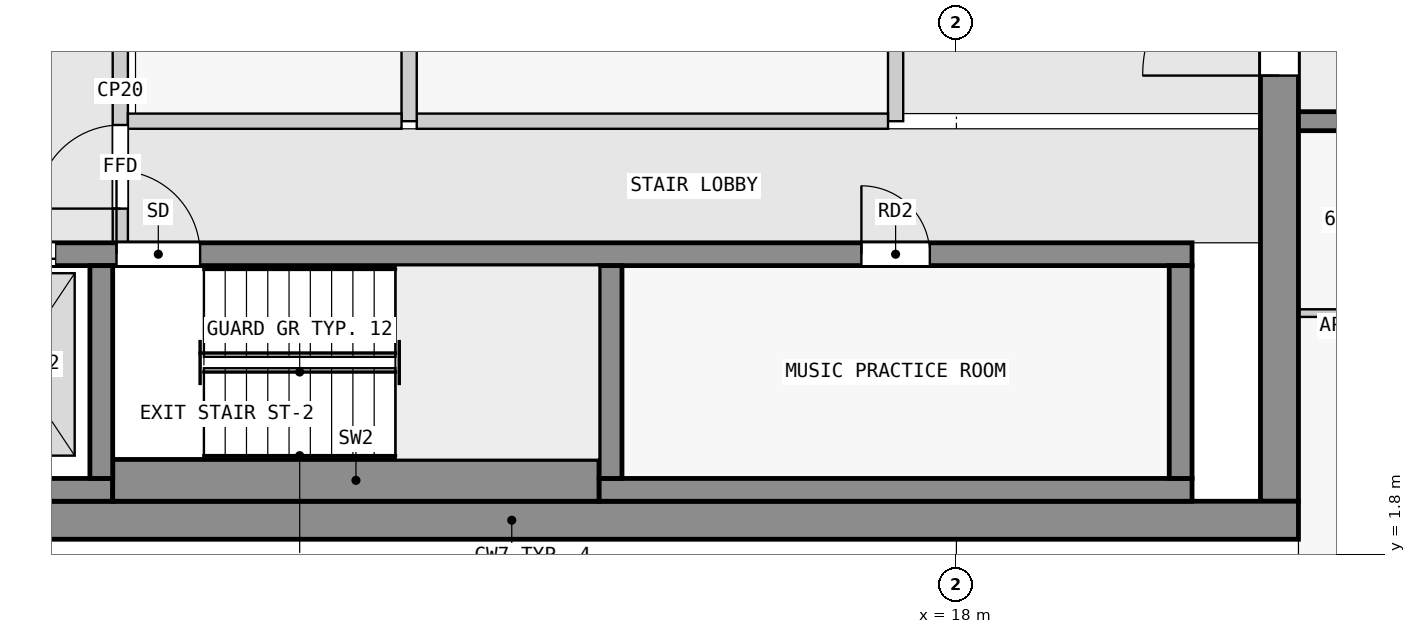
"""IFC4 building model, lengths in metres.
Left out: names, types, materials, properties, quantities, classifications, styles, units other than length and angle.
Written with IfcOpenShell. Run it as: python <this file> out.ifc"""

import sys

from ifc_helpers import new_model, si_unit, direction, frame, frame_2d, origin, place, context, subcontext, project, spatial, rectangle, extrude, element, fill, save


model = new_model("IFC4")
c1 = context("Model", 3, precision=1e-05, world=origin(), true_north=direction((0.0, 1.0)))
c2 = subcontext(c1, "Body", "Model", "MODEL_VIEW")
j1 = project(units=[si_unit("LENGTHUNIT", "METRE"), si_unit("PLANEANGLEUNIT", "RADIAN")], contexts=[c1])
p1 = place(None, origin())
s1 = spatial("IfcSite", under=j1, at=p1, CompositionType="ELEMENT")
p2 = place(p1, origin())
s2 = spatial("IfcBuilding", under=s1, at=p2, CompositionType="ELEMENT")
p3 = place(p2, frame((0.0, 0.0, 249.4)))
s3 = spatial("IfcBuildingStorey", under=s2, at=p3, CompositionType="ELEMENT", Elevation=249.4)
p4 = place(p3, frame((1.8, 2.25, 0.0), z_axis=(0.0, 0.0, 1.0), x_axis=(1.0, 0.0, 0.0)))
e1 = element("IfcWall", 1, at=p4, inside=s3, PredefinedType="SHEAR", context=c2, shape_type="SweptSolid", body=[
    extrude(rectangle(XDim=20.7, YDim=0.5, at=frame_2d((10.35, 0.0))), origin(), (0.0, 0.0, 1.0), 3.25),
])
p5 = place(p3, frame((22.25, 2.5, 0.0), z_axis=(0.0, 0.0, 1.0), x_axis=(0.0, 1.0, 0.0)))
e2 = element("IfcWall", 2, at=p5, inside=s3, PredefinedType="SHEAR", context=c2, shape_type="SweptSolid", body=[
    extrude(rectangle(XDim=15.0, YDim=0.5, at=frame_2d((7.5, 0.0))), origin(), (0.0, 0.0, 1.0), 3.25),
])
p6 = place(p5, frame((5.6, 0.0, 0.0)))
e3 = element("IfcOpeningElement", 3, at=p6, cuts=e2, PredefinedType="OPENING", context=c2, shape_type="SweptSolid", body=[
    extrude(rectangle(XDim=1.8, YDim=2.1, at=frame_2d((0.9, 1.05))), frame((0.0, 0.26, 0.0), z_axis=(0.0, -1.0, 0.0), x_axis=(1.0, 0.0, 0.0)), (0.0, 0.0, 1.0), 0.52),
])
p7 = place(p3, frame((2.3, 2.65, 0.0), z_axis=(0.0, 0.0, 1.0), x_axis=(1.0, 0.0, 0.0)))
e4 = element("IfcWall", 4, at=p7, inside=s3, PredefinedType="SHEAR", context=c2, shape_type="SweptSolid", body=[
    extrude(rectangle(XDim=4.6, YDim=0.3, at=frame_2d((2.3, 0.0))), origin(), (0.0, 0.0, 1.0), 3.25),
])
p8 = place(p3, frame((6.9, 2.775, 0.0), z_axis=(0.0, 0.0, 1.0), x_axis=(1.0, 0.0, 0.0)))
e5 = element("IfcWall", 5, at=p8, inside=s3, PredefinedType="SHEAR", context=c2, shape_type="SweptSolid", body=[
    extrude(rectangle(XDim=6.4, YDim=0.55, at=frame_2d((3.2, 0.0))), origin(), (0.0, 0.0, 1.0), 3.25),
])
p9 = place(p3, frame((13.3, 2.65, 0.0), z_axis=(0.0, 0.0, 1.0), x_axis=(1.0, 0.0, 0.0)))
e6 = element("IfcWall", 6, at=p9, inside=s3, PredefinedType="SHEAR", context=c2, shape_type="SweptSolid", body=[
    extrude(rectangle(XDim=7.8, YDim=0.3, at=frame_2d((3.9, 0.0))), origin(), (0.0, 0.0, 1.0), 3.25),
])
for number, where, z_axis, x_axis in (
    (7, (6.75, 2.8, 0.0), (0.0, 0.0, 1.0), (0.0, 1.0, 0.0)),
    (8, (13.45, 2.8, 0.0), (0.0, 0.0, 1.0), (0.0, 1.0, 0.0)),
    (9, (20.95, 2.8, 0.0), (0.0, 0.0, 1.0), (0.0, 1.0, 0.0)),
):
    element("IfcWall", number, at=place(p3, frame(where, z_axis=z_axis, x_axis=x_axis)), inside=s3, PredefinedType="SHEAR", context=c2, shape_type="SweptSolid", body=[
        extrude(rectangle(XDim=2.8, YDim=0.3, at=frame_2d((1.4, 0.0))), origin(), (0.0, 0.0, 1.0), 3.25),
    ])
p10 = place(p3, frame((2.3, 5.75, 0.0), z_axis=(0.0, 0.0, 1.0), x_axis=(1.0, 0.0, 0.0)))
e10 = element("IfcWall", 10, at=p10, inside=s3, PredefinedType="SHEAR", context=c2, shape_type="SweptSolid", body=[
    extrude(rectangle(XDim=18.8, YDim=0.3, at=frame_2d((9.4, 0.0))), origin(), (0.0, 0.0, 1.0), 3.25),
])
p11 = place(p10, frame((4.65, 0.0, 0.0)))
e11 = element("IfcOpeningElement", 11, at=p11, cuts=e10, PredefinedType="OPENING", context=c2, shape_type="SweptSolid", body=[
    extrude(rectangle(XDim=1.1, YDim=2.1, at=frame_2d((0.55, 1.05))), frame((0.0, 0.16, 0.0), z_axis=(0.0, -1.0, 0.0), x_axis=(1.0, 0.0, 0.0)), (0.0, 0.0, 1.0), 0.32),
])
p12 = place(p10, frame((0.45, 0.0, 0.0)))
e12 = element("IfcOpeningElement", 12, at=p12, cuts=e10, PredefinedType="OPENING", context=c2, shape_type="SweptSolid", body=[
    extrude(rectangle(XDim=1.1, YDim=2.1, at=frame_2d((0.55, 1.05))), frame((0.0, 0.16, 0.0), z_axis=(0.0, -1.0, 0.0), x_axis=(1.0, 0.0, 0.0)), (0.0, 0.0, 1.0), 0.32),
])
p13 = place(p10, frame((2.75, 0.0, 0.0)))
e13 = element("IfcOpeningElement", 13, at=p13, cuts=e10, PredefinedType="OPENING", context=c2, shape_type="SweptSolid", body=[
    extrude(rectangle(XDim=1.1, YDim=2.1, at=frame_2d((0.55, 1.05))), frame((0.0, 0.16, 0.0), z_axis=(0.0, -1.0, 0.0), x_axis=(1.0, 0.0, 0.0)), (0.0, 0.0, 1.0), 0.32),
])
p14 = place(p10, frame((14.45, 0.0, 0.0)))
e14 = element("IfcOpeningElement", 14, at=p14, cuts=e10, PredefinedType="OPENING", context=c2, shape_type="SweptSolid", body=[
    extrude(rectangle(XDim=0.9, YDim=2.1, at=frame_2d((0.45, 1.05))), frame((0.0, 0.16, 0.0), z_axis=(0.0, -1.0, 0.0), x_axis=(1.0, 0.0, 0.0)), (0.0, 0.0, 1.0), 0.32),
])
p15 = place(p3, frame((22.5, 7.5, 0.0), z_axis=(0.0, 0.0, 1.0), x_axis=(1.0, 0.0, 0.0)))
e15 = element("IfcWall", 15, at=p15, inside=s3, PredefinedType="SHEAR", context=c2, shape_type="SweptSolid", body=[
    extrude(rectangle(XDim=22.5, YDim=0.25, at=frame_2d((11.25, 0.0))), origin(), (0.0, 0.0, 1.0), 3.25),
])
p16 = place(p15, frame((1.75, 0.0, 0.0)))
e16 = element("IfcOpeningElement", 16, at=p16, cuts=e15, PredefinedType="OPENING", context=c2, shape_type="SweptSolid", body=[
    extrude(rectangle(XDim=1.0, YDim=2.1, at=frame_2d((0.5, 1.05))), frame((0.0, 0.135, 0.0), z_axis=(0.0, -1.0, 0.0), x_axis=(1.0, 0.0, 0.0)), (0.0, 0.0, 1.0), 0.27),
])
p17 = place(p15, frame((5.85, 0.0, 0.0)))
e17 = element("IfcOpeningElement", 17, at=p17, cuts=e15, PredefinedType="OPENING", context=c2, shape_type="SweptSolid", body=[
    extrude(rectangle(XDim=1.8, YDim=2.1, at=frame_2d((0.9, 1.05))), frame((0.0, 0.135, 0.0), z_axis=(0.0, -1.0, 0.0), x_axis=(1.0, 0.0, 0.0)), (0.0, 0.0, 1.0), 0.27),
])
p18 = place(p15, frame((13.05, 0.0, 0.0)))
e18 = element("IfcOpeningElement", 18, at=p18, cuts=e15, PredefinedType="OPENING", context=c2, shape_type="SweptSolid", body=[
    extrude(rectangle(XDim=1.0, YDim=2.1, at=frame_2d((0.5, 1.05))), frame((0.0, 0.135, 0.0), z_axis=(0.0, -1.0, 0.0), x_axis=(1.0, 0.0, 0.0)), (0.0, 0.0, 1.0), 0.27),
])
p19 = place(p15, frame((18.75, 0.0, 0.0)))
e19 = element("IfcOpeningElement", 19, at=p19, cuts=e15, PredefinedType="OPENING", context=c2, shape_type="SweptSolid", body=[
    extrude(rectangle(XDim=0.9, YDim=2.1, at=frame_2d((0.45, 1.05))), frame((0.0, 0.135, 0.0), z_axis=(0.0, -1.0, 0.0), x_axis=(1.0, 0.0, 0.0)), (0.0, 0.0, 1.0), 0.27),
])
p20 = place(p15, frame((20.95, 0.0, 0.0)))
e20 = element("IfcOpeningElement", 20, at=p20, cuts=e15, PredefinedType="OPENING", context=c2, shape_type="SweptSolid", body=[
    extrude(rectangle(XDim=1.0, YDim=2.1, at=frame_2d((0.5, 1.05))), frame((0.0, 0.135, 0.0), z_axis=(0.0, -1.0, 0.0), x_axis=(1.0, 0.0, 0.0)), (0.0, 0.0, 1.0), 0.27),
])
p21 = place(p3, frame((7.0, 5.9, 0.0), z_axis=(0.0, 0.0, 1.0), x_axis=(0.0, 1.0, 0.0)))
e21 = element("IfcWall", 21, at=p21, inside=s3, PredefinedType="PARTITIONING", context=c2, shape_type="SweptSolid", body=[
    extrude(rectangle(XDim=4.0, YDim=0.2, at=frame_2d((2.0, 0.0))), origin(), (0.0, 0.0, 1.0), 3.25),
])
p22 = place(p21, frame((0.45, 0.0, 0.0)))
e22 = element("IfcOpeningElement", 22, at=p22, cuts=e21, PredefinedType="OPENING", context=c2, shape_type="SweptSolid", body=[
    extrude(rectangle(XDim=1.1, YDim=2.1, at=frame_2d((0.55, 1.05))), frame((0.0, 0.11, 0.0), z_axis=(0.0, -1.0, 0.0), x_axis=(1.0, 0.0, 0.0)), (0.0, 0.0, 1.0), 0.22),
])
p23 = place(p3, frame((7.1, 7.5, 0.0), z_axis=(0.0, 0.0, 1.0), x_axis=(1.0, 0.0, 0.0)))
e23 = element("IfcWall", 23, at=p23, inside=s3, PredefinedType="PARTITIONING", context=c2, shape_type="SweptSolid", body=[
    extrude(rectangle(XDim=3.6, YDim=0.2, at=frame_2d((1.8, 0.0))), origin(), (0.0, 0.0, 1.0), 3.25),
])
p24 = place(p3, frame((10.8, 7.5, 0.0), z_axis=(0.0, 0.0, 1.0), x_axis=(0.0, 1.0, 0.0)))
e24 = element("IfcWall", 24, at=p24, inside=s3, PredefinedType="PARTITIONING", context=c2, shape_type="SweptSolid", body=[
    extrude(rectangle(XDim=4.7, YDim=0.2, at=frame_2d((2.35, 0.0))), origin(), (0.0, 0.0, 1.0), 3.25),
])
p25 = place(p3, frame((10.9, 7.5, 0.0), z_axis=(0.0, 0.0, 1.0), x_axis=(1.0, 0.0, 0.0)))
e25 = element("IfcWall", 25, at=p25, inside=s3, PredefinedType="PARTITIONING", context=c2, shape_type="SweptSolid", body=[
    extrude(rectangle(XDim=6.2, YDim=0.2, at=frame_2d((3.1, 0.0))), origin(), (0.0, 0.0, 1.0), 3.25),
])
p26 = place(p3, frame((17.2, 7.5, 0.0), z_axis=(0.0, 0.0, 1.0), x_axis=(0.0, 1.0, 0.0)))
e26 = element("IfcWall", 26, at=p26, inside=s3, PredefinedType="PARTITIONING", context=c2, shape_type="SweptSolid", body=[
    extrude(rectangle(XDim=4.7, YDim=0.2, at=frame_2d((2.35, 0.0))), origin(), (0.0, 0.0, 1.0), 3.25),
])
p27 = place(p3, frame((22.5, 4.975, 0.0), z_axis=(0.0, 0.0, 1.0), x_axis=(1.0, 0.0, 0.0)))
e27 = element("IfcWall", 27, at=p27, inside=s3, PredefinedType="PARTITIONING", context=c2, shape_type="SweptSolid", body=[
    extrude(rectangle(XDim=1.45, YDim=0.1, at=frame_2d((0.725, 0.0))), origin(), (0.0, 0.0, 1.0), 3.25),
])
p28 = place(p22, origin())
e28 = element("IfcDoor", 28, at=p28, inside=s3, OperationType="SINGLE_SWING_LEFT", PredefinedType="DOOR", context=c2, shape_type="SweptSolid", body=[
    extrude(rectangle(XDim=1.1, YDim=2.1, at=frame_2d((0.55, 1.05))), frame((0.0, 0.025, 0.0), z_axis=(0.0, -1.0, 0.0), x_axis=(1.0, 0.0, 0.0)), (0.0, 0.0, 1.0), 0.05),
])
fill(e22, e28)
p29 = place(p11, origin())
e29 = element("IfcDoor", 29, at=p29, inside=s3, OperationType="SINGLE_SWING_LEFT", PredefinedType="DOOR", context=c2, shape_type="SweptSolid", body=[
    extrude(rectangle(XDim=1.1, YDim=2.1, at=frame_2d((0.55, 1.05))), frame((0.0, 0.025, 0.0), z_axis=(0.0, -1.0, 0.0), x_axis=(1.0, 0.0, 0.0)), (0.0, 0.0, 1.0), 0.05),
])
fill(e11, e29)
p30 = place(p13, origin())
e30 = element("IfcDoor", 30, at=p30, inside=s3, OperationType="DOUBLE_DOOR_SLIDING", PredefinedType="DOOR", context=c2, shape_type="SweptSolid", body=[
    extrude(rectangle(XDim=1.1, YDim=2.1, at=frame_2d((0.55, 1.05))), frame((0.0, 0.025, 0.0), z_axis=(0.0, -1.0, 0.0), x_axis=(1.0, 0.0, 0.0)), (0.0, 0.0, 1.0), 0.05),
])
fill(e13, e30)
p31 = place(p6, origin())
e31 = element("IfcDoor", 31, at=p31, inside=s3, OperationType="DOUBLE_DOOR_SINGLE_SWING", PredefinedType="DOOR", context=c2, shape_type="SweptSolid", body=[
    extrude(rectangle(XDim=1.8, YDim=2.1, at=frame_2d((0.9, 1.05))), frame((0.0, 0.025, 0.0), z_axis=(0.0, -1.0, 0.0), x_axis=(1.0, 0.0, 0.0)), (0.0, 0.0, 1.0), 0.05),
])
fill(e3, e31)
p32 = place(p14, origin())
e32 = element("IfcDoor", 32, at=p32, inside=s3, OperationType="SINGLE_SWING_LEFT", PredefinedType="DOOR", context=c2, shape_type="SweptSolid", body=[
    extrude(rectangle(XDim=0.9, YDim=2.1, at=frame_2d((0.45, 1.05))), frame((0.0, 0.025, 0.0), z_axis=(0.0, -1.0, 0.0), x_axis=(1.0, 0.0, 0.0)), (0.0, 0.0, 1.0), 0.05),
])
fill(e14, e32)
save(model, sys.argv[1])
